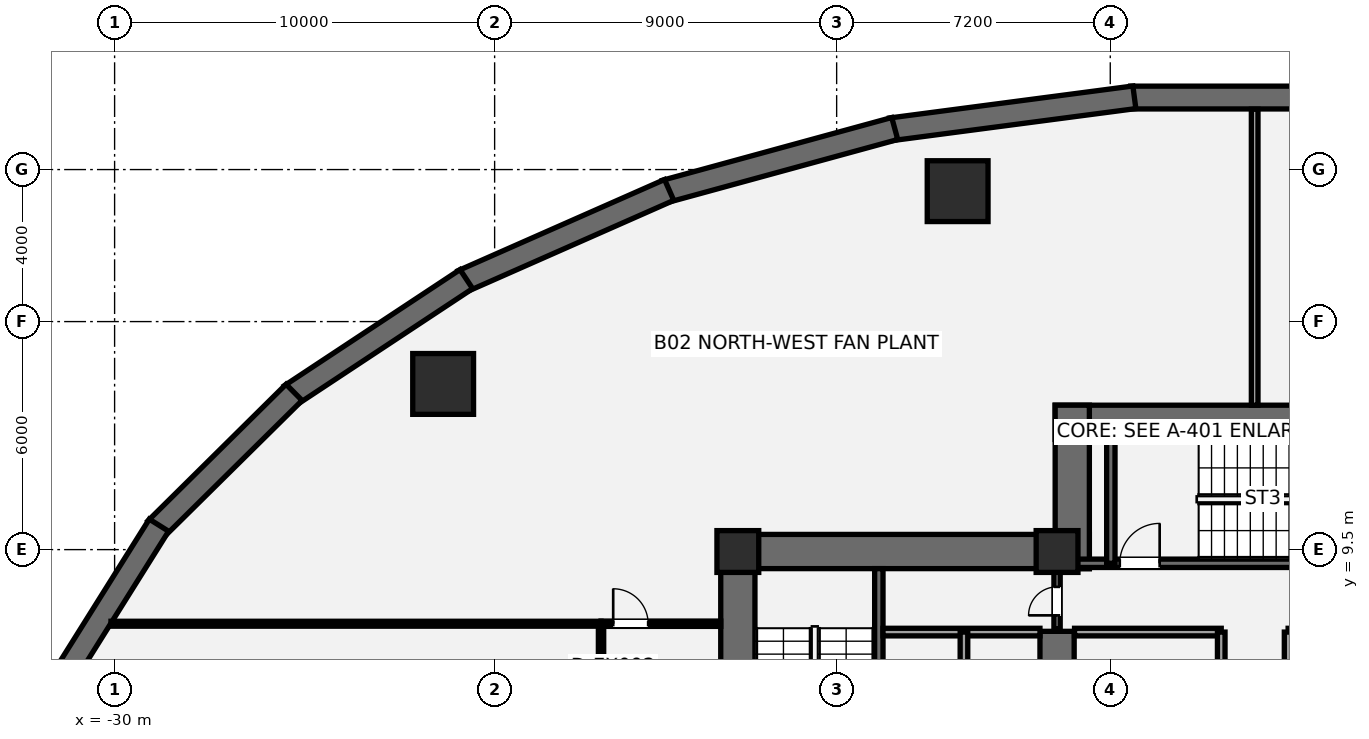
"""IFC4 building model, lengths in metres.
Left out: names, types, materials, properties, quantities, classifications, styles, units other than length and angle.
Written with IfcOpenShell. Run it as: python <this file> out.ifc"""

import sys

from ifc_helpers import new_model, si_unit, direction, frame, frame_2d, origin, origin_2d, place, context, subcontext, project, spatial, rectangle, hollow_circle, extrude, element, fill, save


model = new_model("IFC4")
c1 = context("Model", 3, precision=1e-05, world=origin(), true_north=direction((0.0, 1.0)))
c2 = subcontext(c1, "Body", "Model", "MODEL_VIEW")
j1 = project(units=[si_unit("LENGTHUNIT", "METRE"), si_unit("PLANEANGLEUNIT", "RADIAN")], contexts=[c1])
p1 = place(None, origin())
s1 = spatial("IfcSite", under=j1, at=p1, CompositionType="ELEMENT")
p2 = place(p1, origin())
s2 = spatial("IfcBuilding", under=s1, at=p2, CompositionType="ELEMENT")
p3 = place(p2, frame((0.0, 0.0, -8.8)))
s3 = spatial("IfcBuildingStorey", under=s2, at=p3, CompositionType="ELEMENT", Elevation=-8.8)
p4 = place(p3, frame((3.265, 21.395, 0.0), z_axis=(0.0, 0.0, 1.0), x_axis=(-1.0, 0.0, 0.0)))
e1 = element("IfcWall", 1, at=p4, inside=s3, PredefinedType="USERDEFINED", context=c2, shape_type="SweptSolid", body=[
    extrude(rectangle(XDim=6.529, YDim=0.6, at=frame_2d((3.265, 0.0))), origin(), (0.0, 0.0, 1.0), 4.4),
])
p5 = place(p3, frame((-3.166, 21.402, 0.0), z_axis=(0.0, 0.0, 1.0), x_axis=(-0.991471782517, -0.130321542624, 0.0)))
e2 = element("IfcWall", 2, at=p5, inside=s3, PredefinedType="USERDEFINED", context=c2, shape_type="SweptSolid", body=[
    extrude(rectangle(XDim=6.459, YDim=0.6, at=frame_2d((3.23, 0.0))), origin(), (0.0, 0.0, 1.0), 4.4),
])
p6 = place(p3, frame((-9.471, 20.58, 0.0), z_axis=(0.0, 0.0, 1.0), x_axis=(-0.964548276597, -0.263906464707, 0.0)))
e3 = element("IfcWall", 3, at=p6, inside=s3, PredefinedType="USERDEFINED", context=c2, shape_type="SweptSolid", body=[
    extrude(rectangle(XDim=6.257, YDim=0.6, at=frame_2d((3.128, 0.0))), origin(), (0.0, 0.0, 1.0), 4.4),
])
p7 = place(p3, frame((-15.407, 18.964, 0.0), z_axis=(0.0, 0.0, 1.0), x_axis=(-0.91483072277, -0.403837527574, 0.0)))
e4 = element("IfcWall", 4, at=p7, inside=s3, PredefinedType="USERDEFINED", context=c2, shape_type="SweptSolid", body=[
    extrude(rectangle(XDim=5.94, YDim=0.6, at=frame_2d((2.97, 0.0))), origin(), (0.0, 0.0, 1.0), 4.4),
])
p8 = place(p3, frame((-20.745, 16.618, 0.0), z_axis=(0.0, 0.0, 1.0), x_axis=(-0.834367518908, -0.551208529861, 0.0)))
e5 = element("IfcWall", 5, at=p8, inside=s3, PredefinedType="USERDEFINED", context=c2, shape_type="SweptSolid", body=[
    extrude(rectangle(XDim=5.542, YDim=0.6, at=frame_2d((2.771, 0.0))), origin(), (0.0, 0.0, 1.0), 4.4),
])
p9 = place(p3, frame((-25.277, 13.638, 0.0), z_axis=(0.0, 0.0, 1.0), x_axis=(-0.711105403666, -0.70308541791, 0.0)))
e6 = element("IfcWall", 6, at=p9, inside=s3, PredefinedType="USERDEFINED", context=c2, shape_type="SweptSolid", body=[
    extrude(rectangle(XDim=5.114, YDim=0.6, at=frame_2d((2.557, 0.0))), origin(), (0.0, 0.0, 1.0), 4.4),
])
p10 = place(p3, frame((-28.833, 10.142, 0.0), z_axis=(0.0, 0.0, 1.0), x_axis=(-0.531244363113, -0.847218641592, 0.0)))
e7 = element("IfcWall", 7, at=p10, inside=s3, PredefinedType="USERDEFINED", context=c2, shape_type="SweptSolid", body=[
    extrude(rectangle(XDim=4.72, YDim=0.6, at=frame_2d((2.36, 0.0))), origin(), (0.0, 0.0, 1.0), 4.4),
])
p11 = place(p3, frame((-13.6, 0.95, 0.0), z_axis=(0.0, 0.0, 1.0), x_axis=(0.0, 1.0, 0.0)))
e8 = element("IfcWall", 8, at=p11, inside=s3, PredefinedType="SHEAR", context=c2, shape_type="SweptSolid", body=[
    extrude(rectangle(XDim=8.95, YDim=0.9, at=frame_2d((4.475, 0.0))), origin(), (0.0, 0.0, 1.0), 4.4),
])
p12 = place(p3, frame((-14.05, 9.45, 0.0), z_axis=(0.0, 0.0, 1.0), x_axis=(1.0, 0.0, 0.0)))
e9 = element("IfcWall", 9, at=p12, inside=s3, PredefinedType="SHEAR", context=c2, shape_type="SweptSolid", body=[
    extrude(rectangle(XDim=9.7, YDim=0.9, at=frame_2d((4.85, 0.0))), origin(), (0.0, 0.0, 1.0), 4.4),
])
p13 = place(p3, frame((-5.2, 5.35, 0.0), z_axis=(0.0, 0.0, 1.0), x_axis=(0.0, 1.0, 0.0)))
e10 = element("IfcWall", 10, at=p13, inside=s3, PredefinedType="SHEAR", context=c2, shape_type="SweptSolid", body=[
    extrude(rectangle(XDim=2.0, YDim=0.9, at=frame_2d((1.0, 0.0))), origin(), (0.0, 0.0, 1.0), 4.4),
])
p14 = place(p3, frame((-9.89, 1.85, 0.0), z_axis=(0.0, 0.0, 1.0), x_axis=(0.0, 1.0, 0.0)))
e11 = element("IfcWall", 11, at=p14, inside=s3, PredefinedType="SHEAR", context=c2, shape_type="SweptSolid", body=[
    extrude(rectangle(XDim=7.15, YDim=0.22, at=frame_2d((3.575, 0.0))), origin(), (0.0, 0.0, 1.0), 4.4),
])
p15 = place(p3, frame((-5.25, 12.85, 0.0), z_axis=(0.0, 0.0, 1.0), x_axis=(1.0, 0.0, 0.0)))
e12 = element("IfcWall", 12, at=p15, inside=s3, PredefinedType="SHEAR", context=c2, shape_type="SweptSolid", body=[
    extrude(rectangle(XDim=10.5, YDim=0.9, at=frame_2d((5.25, 0.0))), origin(), (0.0, 0.0, 1.0), 4.4),
])
p16 = place(p3, frame((-4.8, 9.0, 0.0), z_axis=(0.0, 0.0, 1.0), x_axis=(0.0, 1.0, 0.0)))
e13 = element("IfcWall", 13, at=p16, inside=s3, PredefinedType="SHEAR", context=c2, shape_type="SweptSolid", body=[
    extrude(rectangle(XDim=4.3, YDim=0.9, at=frame_2d((2.15, 0.0))), origin(), (0.0, 0.0, 1.0), 4.4),
])
p17 = place(p3, frame((-4.7, 9.14, 0.0), z_axis=(0.0, 0.0, 1.0), x_axis=(1.0, 0.0, 0.0)))
e14 = element("IfcWall", 14, at=p17, inside=s3, PredefinedType="SHEAR", context=c2, shape_type="SweptSolid", body=[
    extrude(rectangle(XDim=9.3, YDim=0.22, at=frame_2d((4.65, 0.0))), origin(), (0.0, 0.0, 1.0), 4.4),
])
p18 = place(p17, frame((1.15, 0.0, 0.0)))
e15 = element("IfcOpeningElement", 15, at=p18, cuts=e14, PredefinedType="OPENING", context=c2, shape_type="SweptSolid", body=[
    extrude(rectangle(XDim=1.05, YDim=2.15, at=frame_2d((0.525, 1.075))), frame((0.0, 0.12, 0.0), z_axis=(0.0, -1.0, 0.0), x_axis=(1.0, 0.0, 0.0)), (0.0, 0.0, 1.0), 0.24),
])
p19 = place(p3, frame((-3.785, 9.14, 0.0), z_axis=(0.0, 0.0, 1.0), x_axis=(0.0, 1.0, 0.0)))
e16 = element("IfcWall", 16, at=p19, inside=s3, PredefinedType="SHEAR", context=c2, shape_type="SweptSolid", body=[
    extrude(rectangle(XDim=3.26, YDim=0.22, at=frame_2d((1.63, 0.0))), origin(), (0.0, 0.0, 1.0), 4.4),
])
for number, where, z_axis, x_axis in (
    (17, (-13.6, 9.45, 0.0), (0.0, 0.0, 1.0), (1.0, 0.0, 0.0)),
    (18, (-5.2, 9.45, 0.0), (0.0, 0.0, 1.0), (1.0, 0.0, 0.0)),
):
    element("IfcColumn", number, at=place(p3, frame(where, z_axis=z_axis, x_axis=x_axis)), inside=s3, PredefinedType="COLUMN", context=c2, shape_type="SweptSolid", body=[
        extrude(rectangle(XDim=1.1, YDim=1.1, at=origin_2d()), origin(), (0.0, 0.0, 1.0), 4.4),
    ])
for number, where, z_axis, x_axis in (
    (19, (-7.816, 18.932, 0.0), (0.0, 0.0, 1.0), (1.0, 0.0, 0.0)),
    (20, (-21.354, 13.859, 0.0), (0.0, 0.0, 1.0), (1.0, 0.0, 0.0)),
):
    element("IfcColumn", number, at=place(p3, frame(where, z_axis=z_axis, x_axis=x_axis)), inside=s3, PredefinedType="USERDEFINED", context=c2, shape_type="SweptSolid", body=[
        extrude(hollow_circle(Radius=0.8, WallThickness=0.06, at=origin_2d()), origin(), (0.0, 0.0, 1.0), 4.4),
    ])
p20 = place(p3, frame((-9.78, 7.33, 0.0), z_axis=(0.0, 0.0, 1.0), x_axis=(1.0, 0.0, 0.0)))
e21 = element("IfcWall", 21, at=p20, inside=s3, PredefinedType="SOLIDWALL", context=c2, shape_type="SweptSolid", body=[
    extrude(rectangle(XDim=4.13, YDim=0.2, at=frame_2d((2.065, 0.0))), origin(), (0.0, 0.0, 1.0), 4.14),
])
p21 = place(p3, frame((-7.65, 5.47, 0.0), z_axis=(0.0, 0.0, 1.0), x_axis=(0.0, 1.0, 0.0)))
e22 = element("IfcWall", 22, at=p21, inside=s3, PredefinedType="SOLIDWALL", context=c2, shape_type="SweptSolid", body=[
    extrude(rectangle(XDim=1.86, YDim=0.2, at=frame_2d((0.93, 0.0))), origin(), (0.0, 0.0, 1.0), 4.14),
])
for number, where, z_axis, x_axis in (
    (23, (-4.74, 7.33, 0.0), (0.0, 0.0, 1.0), (1.0, 0.0, 0.0)),
    (24, (0.88, 7.33, 0.0), (0.0, 0.0, 1.0), (1.0, 0.0, 0.0)),
):
    element("IfcWall", number, at=place(p3, frame(where, z_axis=z_axis, x_axis=x_axis)), inside=s3, PredefinedType="SOLIDWALL", context=c2, shape_type="SweptSolid", body=[
        extrude(rectangle(XDim=3.86, YDim=0.2, at=frame_2d((1.93, 0.0))), origin(), (0.0, 0.0, 1.0), 4.14),
    ])
for number, where, z_axis, x_axis in (
    (25, (-0.88, 5.52, 0.0), (0.0, 0.0, 1.0), (0.0, 1.0, 0.0)),
    (26, (0.88, 5.52, 0.0), (0.0, 0.0, 1.0), (0.0, 1.0, 0.0)),
):
    element("IfcWall", number, at=place(p3, frame(where, z_axis=z_axis, x_axis=x_axis)), inside=s3, PredefinedType="SOLIDWALL", context=c2, shape_type="SweptSolid", body=[
        extrude(rectangle(XDim=1.81, YDim=0.2, at=frame_2d((0.905, 0.0))), origin(), (0.0, 0.0, 1.0), 4.14),
    ])
p22 = place(p3, frame((-5.2, 7.42, 0.0), z_axis=(0.0, 0.0, 1.0), x_axis=(0.0, 1.0, 0.0)))
e27 = element("IfcWall", 27, at=p22, inside=s3, PredefinedType="PARTITIONING", context=c2, shape_type="SweptSolid", body=[
    extrude(rectangle(XDim=1.58, YDim=0.165, at=frame_2d((0.79, 0.0))), origin(), (0.0, 0.0, 1.0), 4.14),
])
p23 = place(p22, frame((0.35, 0.0, 0.0)))
e28 = element("IfcOpeningElement", 28, at=p23, cuts=e27, PredefinedType="OPENING", context=c2, shape_type="SweptSolid", body=[
    extrude(rectangle(XDim=0.75, YDim=2.1, at=frame_2d((0.375, 1.05))), frame((0.0, 0.093, 0.0), z_axis=(0.0, -1.0, 0.0), x_axis=(1.0, 0.0, 0.0)), (0.0, 0.0, 1.0), 0.185),
])
p24 = place(p3, frame((-17.2, -17.836, 0.0), z_axis=(0.0, 0.0, 1.0), x_axis=(0.0, 1.0, 0.0)))
e29 = element("IfcWall", 29, at=p24, inside=s3, PredefinedType="PARTITIONING", context=c2, shape_type="SweptSolid", body=[
    extrude(rectangle(XDim=25.386, YDim=0.14, at=frame_2d((12.693, 0.0))), origin(), (0.0, 0.0, 1.0), 3.508),
])
p25 = place(p24, frame((15.036, 0.0, 0.0)))
e30 = element("IfcOpeningElement", 30, at=p25, cuts=e29, PredefinedType="OPENING", context=c2, shape_type="SweptSolid", body=[
    extrude(rectangle(XDim=0.9, YDim=2.1, at=frame_2d((0.45, 1.05))), frame((0.0, 0.08, 0.0), z_axis=(0.0, -1.0, 0.0), x_axis=(1.0, 0.0, 0.0)), (0.0, 0.0, 1.0), 0.16),
])
p26 = place(p24, frame((21.911, 0.0, 0.0)))
e31 = element("IfcOpeningElement", 31, at=p26, cuts=e29, PredefinedType="OPENING", context=c2, shape_type="SweptSolid", body=[
    extrude(rectangle(XDim=0.9, YDim=2.1, at=frame_2d((0.45, 1.05))), frame((0.0, 0.08, 0.0), z_axis=(0.0, -1.0, 0.0), x_axis=(1.0, 0.0, 0.0)), (0.0, 0.0, 1.0), 0.16),
])
p27 = place(p3, frame((-17.2, 7.55, 0.0), z_axis=(0.0, 0.0, 1.0), x_axis=(1.0, 0.0, 0.0)))
e32 = element("IfcWall", 32, at=p27, inside=s3, PredefinedType="PARTITIONING", context=c2, shape_type="SweptSolid", body=[
    extrude(rectangle(XDim=3.15, YDim=0.14, at=frame_2d((1.575, 0.0))), origin(), (0.0, 0.0, 1.0), 4.14),
])
p28 = place(p27, frame((0.32, 0.0, 0.0)))
e33 = element("IfcOpeningElement", 33, at=p28, cuts=e32, PredefinedType="OPENING", context=c2, shape_type="SweptSolid", body=[
    extrude(rectangle(XDim=0.92, YDim=2.15, at=frame_2d((0.46, 1.075))), frame((0.0, 0.08, 0.0), z_axis=(0.0, -1.0, 0.0), x_axis=(1.0, 0.0, 0.0)), (0.0, 0.0, 1.0), 0.16),
])
p29 = place(p3, frame((0.0, 13.3, 0.0), z_axis=(0.0, 0.0, 1.0), x_axis=(0.0, 1.0, 0.0)))
e34 = element("IfcWall", 34, at=p29, inside=s3, PredefinedType="PARTITIONING", context=c2, shape_type="SweptSolid", body=[
    extrude(rectangle(XDim=7.787, YDim=0.175, at=frame_2d((3.894, 0.0))), origin(), (0.0, 0.0, 1.0), 4.14),
])
p30 = place(p3, frame((-30.095, 7.55, 0.0), z_axis=(0.0, 0.0, 1.0), x_axis=(1.0, 0.0, 0.0)))
e35 = element("IfcWall", 35, at=p30, inside=s3, PredefinedType="PARTITIONING", context=c2, shape_type="SweptSolid", body=[
    extrude(rectangle(XDim=12.895, YDim=0.13, at=frame_2d((6.448, 0.0))), origin(), (0.0, 0.0, 1.0), 3.118),
])
p31 = place(p18, origin())
e36 = element("IfcDoor", 36, at=p31, inside=s3, OperationType="SINGLE_SWING_RIGHT", PredefinedType="DOOR", context=c2, shape_type="SweptSolid", body=[
    extrude(rectangle(XDim=1.05, YDim=2.15, at=frame_2d((0.525, 1.075))), frame((0.0, 0.025, 0.0), z_axis=(0.0, -1.0, 0.0), x_axis=(1.0, 0.0, 0.0)), (0.0, 0.0, 1.0), 0.05),
])
fill(e15, e36)
p32 = place(p23, origin())
e37 = element("IfcDoor", 37, at=p32, inside=s3, OperationType="SINGLE_SWING_LEFT", PredefinedType="DOOR", context=c2, shape_type="SweptSolid", body=[
    extrude(rectangle(XDim=0.75, YDim=2.1, at=frame_2d((0.375, 1.05))), frame((0.0, 0.025, 0.0), z_axis=(0.0, -1.0, 0.0), x_axis=(1.0, 0.0, 0.0)), (0.0, 0.0, 1.0), 0.05),
])
fill(e28, e37)
p33 = place(p28, origin())
e38 = element("IfcDoor", 38, at=p33, inside=s3, OperationType="SINGLE_SWING_LEFT", PredefinedType="DOOR", context=c2, shape_type="SweptSolid", body=[
    extrude(rectangle(XDim=0.92, YDim=2.15, at=frame_2d((0.46, 1.075))), frame((0.0, 0.025, 0.0), z_axis=(0.0, -1.0, 0.0), x_axis=(1.0, 0.0, 0.0)), (0.0, 0.0, 1.0), 0.05),
])
fill(e33, e38)
save(model, sys.argv[1])
